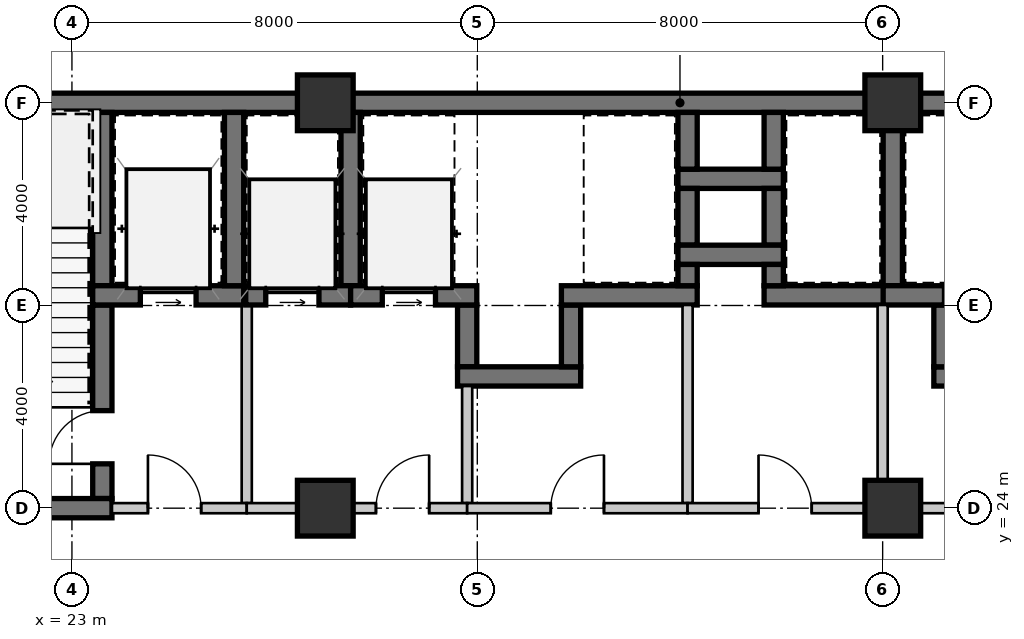
"""IFC4 building model, lengths in metres.
Left out: names, types, materials, properties, quantities, classifications, styles, units other than length and angle.
Written with IfcOpenShell. Run it as: python <this file> out.ifc"""

import sys

from ifc_helpers import new_model, si_unit, direction, frame, frame_2d, origin, origin_2d, place, context, subcontext, project, spatial, rectangle, extrude, source, transform, mapped, element, fill, save


model = new_model("IFC4")
c1 = context("Model", 3, precision=1e-05, world=origin(), true_north=direction((0.0, 1.0)))
c2 = subcontext(c1, "Body", "Model", "MODEL_VIEW")
j1 = project(units=[si_unit("LENGTHUNIT", "METRE"), si_unit("PLANEANGLEUNIT", "RADIAN")], contexts=[c1])
p1 = place(None, origin())
s1 = spatial("IfcSite", under=j1, at=p1, CompositionType="ELEMENT")
p2 = place(p1, origin())
s2 = spatial("IfcBuilding", under=s1, at=p2, CompositionType="ELEMENT")
p3 = place(p2, frame((0.0, 0.0, 8.4)))
s3 = spatial("IfcBuildingStorey", under=s2, at=p3, CompositionType="ELEMENT", Elevation=8.4)
m1 = source(origin(), c2, "Body", "SweptSolid", [
    extrude(rectangle(XDim=1.1, YDim=1.1, at=origin_2d()), origin(), (0.0, 0.0, 1.0), 4.55),
])
for number, where, z_axis, x_axis in (
    (1, (28.0, 24.0, 0.0), (0.0, 0.0, 1.0), (1.0, 0.0, 0.0)),
    (2, (39.2, 24.0, 0.0), (0.0, 0.0, 1.0), (1.0, 0.0, 0.0)),
    (3, (28.0, 32.0, 0.0), (0.0, 0.0, 1.0), (1.0, 0.0, 0.0)),
    (4, (39.2, 32.0, 0.0), (0.0, 0.0, 1.0), (1.0, 0.0, 0.0)),
):
    element("IfcColumn", number, at=place(p3, frame(where, z_axis=z_axis, x_axis=x_axis)), inside=s3, PredefinedType="COLUMN", context=c2, shape_type="MappedRepresentation", body=[
        mapped(m1, transform((0.0, 0.0, 0.0), scale=1.0)),
    ])
m2 = source(origin(), c2, "Body", "SweptSolid", [
    extrude(rectangle(XDim=9.19, YDim=0.38, at=frame_2d((4.595, 0.0))), origin(), (0.0, 0.0, 1.0), 4.29),
])
p4 = place(p3, frame((18.81, 32.0, 0.0), z_axis=(0.0, 0.0, 1.0), x_axis=(1.0, 0.0, 0.0)))
e5 = element("IfcWall", 5, at=p4, inside=s3, PredefinedType="SHEAR", context=c2, shape_type="MappedRepresentation", body=[
    mapped(m2, transform((0.0, 0.0, 0.0), scale=1.0)),
])
m3 = source(origin(), c2, "Body", "SweptSolid", [
    extrude(rectangle(XDim=11.2, YDim=0.38, at=frame_2d((5.6, 0.0))), origin(), (0.0, 0.0, 1.0), 4.29),
])
p5 = place(p3, frame((28.0, 32.0, 0.0), z_axis=(0.0, 0.0, 1.0), x_axis=(1.0, 0.0, 0.0)))
e6 = element("IfcWall", 6, at=p5, inside=s3, PredefinedType="SHEAR", context=c2, shape_type="MappedRepresentation", body=[
    mapped(m3, transform((0.0, 0.0, 0.0), scale=1.0)),
])
m4 = source(origin(), c2, "Body", "SweptSolid", [
    extrude(rectangle(XDim=11.99, YDim=0.38, at=frame_2d((5.995, 0.0))), origin(), (0.0, 0.0, 1.0), 4.29),
])
p6 = place(p3, frame((39.2, 32.0, 0.0), z_axis=(0.0, 0.0, 1.0), x_axis=(1.0, 0.0, 0.0)))
e7 = element("IfcWall", 7, at=p6, inside=s3, PredefinedType="SHEAR", context=c2, shape_type="MappedRepresentation", body=[
    mapped(m4, transform((0.0, 0.0, 0.0), scale=1.0)),
])
m5 = source(origin(), c2, "Body", "SweptSolid", [
    extrude(rectangle(XDim=3.42, YDim=0.38, at=frame_2d((1.71, 0.0))), origin(), (0.0, 0.0, 1.0), 4.29),
])
p7 = place(p3, frame((23.6, 28.39, 0.0), z_axis=(0.0, 0.0, 1.0), x_axis=(0.0, 1.0, 0.0)))
e8 = element("IfcWall", 8, at=p7, inside=s3, PredefinedType="SHEAR", context=c2, shape_type="MappedRepresentation", body=[
    mapped(m5, transform((0.0, 0.0, 0.0), scale=1.0)),
])
m6 = source(origin(), c2, "Body", "SweptSolid", [
    extrude(rectangle(XDim=3.82, YDim=0.38, at=frame_2d((1.91, 0.0))), origin(), (0.0, 0.0, 1.0), 4.29),
])
p8 = place(p3, frame((23.6, 24.19, 0.0), z_axis=(0.0, 0.0, 1.0), x_axis=(0.0, 1.0, 0.0)))
e9 = element("IfcWall", 9, at=p8, inside=s3, PredefinedType="SHEAR", context=c2, shape_type="MappedRepresentation", body=[
    mapped(m6, transform((0.0, 0.0, 0.0), scale=1.0)),
])
m7 = source(origin(), c2, "Body", "SweptSolid", [
    extrude(rectangle(XDim=1.05, YDim=2.1, at=frame_2d((0.525, 1.05))), frame((0.0, 0.2, 0.0), z_axis=(0.0, -1.0, 0.0), x_axis=(1.0, 0.0, 0.0)), (0.0, 0.0, 1.0), 0.4),
])
p9 = place(p8, frame((0.685, 0.0, 0.0)))
e10 = element("IfcOpeningElement", 10, at=p9, cuts=e9, PredefinedType="OPENING", context=c2, shape_type="MappedRepresentation", body=[
    mapped(m7, transform((0.0, 0.0, 0.0), scale=1.0)),
])
m8 = source(origin(), c2, "Body", "SweptSolid", [
    extrude(rectangle(XDim=4.98, YDim=0.38, at=frame_2d((2.49, 0.0))), origin(), (0.0, 0.0, 1.0), 4.29),
])
p10 = place(p3, frame((18.81, 24.0, 0.0), z_axis=(0.0, 0.0, 1.0), x_axis=(1.0, 0.0, 0.0)))
e11 = element("IfcWall", 11, at=p10, inside=s3, PredefinedType="SHEAR", context=c2, shape_type="MappedRepresentation", body=[
    mapped(m8, transform((0.0, 0.0, 0.0), scale=1.0)),
])
m9 = source(origin(), c2, "Body", "SweptSolid", [
    extrude(rectangle(XDim=2.98, YDim=0.38, at=frame_2d((1.49, 0.0))), origin(), (0.0, 0.0, 1.0), 4.29),
])
p11 = place(p3, frame((23.41, 28.2, 0.0), z_axis=(0.0, 0.0, 1.0), x_axis=(1.0, 0.0, 0.0)))
e12 = element("IfcWall", 12, at=p11, inside=s3, PredefinedType="SHEAR", context=c2, shape_type="MappedRepresentation", body=[
    mapped(m9, transform((0.0, 0.0, 0.0), scale=1.0)),
])
m10 = source(origin(), c2, "Body", "SweptSolid", [
    extrude(rectangle(XDim=1.1, YDim=2.15, at=frame_2d((0.55, 1.075))), frame((0.0, 0.2, 0.0), z_axis=(0.0, -1.0, 0.0), x_axis=(1.0, 0.0, 0.0)), (0.0, 0.0, 1.0), 0.4),
])
p12 = place(p11, frame((0.94, 0.0, 0.0)))
e13 = element("IfcOpeningElement", 13, at=p12, cuts=e12, PredefinedType="OPENING", context=c2, shape_type="MappedRepresentation", body=[
    mapped(m10, transform((0.0, 0.0, 0.0), scale=1.0)),
])
p13 = place(p3, frame((26.2, 28.39, 0.0), z_axis=(0.0, 0.0, 1.0), x_axis=(0.0, 1.0, 0.0)))
e14 = element("IfcWall", 14, at=p13, inside=s3, PredefinedType="SHEAR", context=c2, shape_type="MappedRepresentation", body=[
    mapped(m5, transform((0.0, 0.0, 0.0), scale=1.0)),
])
m11 = source(origin(), c2, "Body", "SweptSolid", [
    extrude(rectangle(XDim=3.91, YDim=0.2, at=frame_2d((1.955, 0.0))), origin(), (0.0, 0.0, 1.0), 4.29),
])
p14 = place(p3, frame((26.45, 24.1, 0.0), z_axis=(0.0, 0.0, 1.0), x_axis=(0.0, 1.0, 0.0)))
e15 = element("IfcWall", 15, at=p14, inside=s3, PredefinedType="SOLIDWALL", context=c2, shape_type="MappedRepresentation", body=[
    mapped(m11, transform((0.0, 0.0, 0.0), scale=1.0)),
])
m12 = source(origin(), c2, "Body", "SweptSolid", [
    extrude(rectangle(XDim=2.66, YDim=0.2, at=frame_2d((1.33, 0.0))), origin(), (0.0, 0.0, 1.0), 3.83),
])
p15 = place(p3, frame((23.79, 24.0, 0.0), z_axis=(0.0, 0.0, 1.0), x_axis=(1.0, 0.0, 0.0)))
e16 = element("IfcWall", 16, at=p15, inside=s3, PredefinedType="SOLIDWALL", context=c2, shape_type="MappedRepresentation", body=[
    mapped(m12, transform((0.0, 0.0, 0.0), scale=1.0)),
])
m13 = source(origin(), c2, "Body", "SweptSolid", [
    extrude(rectangle(XDim=1.05, YDim=2.1, at=frame_2d((0.525, 1.05))), frame((0.0, 0.11, 0.0), z_axis=(0.0, -1.0, 0.0), x_axis=(1.0, 0.0, 0.0)), (0.0, 0.0, 1.0), 0.22),
])
p16 = place(p15, frame((0.71, 0.0, 0.0)))
e17 = element("IfcOpeningElement", 17, at=p16, cuts=e16, PredefinedType="OPENING", context=c2, shape_type="MappedRepresentation", body=[
    mapped(m13, transform((0.0, 0.0, 0.0), scale=1.0)),
])
m14 = source(origin(), c2, "Body", "SweptSolid", [
    extrude(rectangle(XDim=2.08, YDim=0.38, at=frame_2d((1.04, 0.0))), origin(), (0.0, 0.0, 1.0), 4.29),
])
p17 = place(p3, frame((34.96, 30.5, 0.0), z_axis=(0.0, 0.0, 1.0), x_axis=(1.0, 0.0, 0.0)))
e18 = element("IfcWall", 18, at=p17, inside=s3, PredefinedType="SHEAR", context=c2, shape_type="MappedRepresentation", body=[
    mapped(m14, transform((0.0, 0.0, 0.0), scale=1.0)),
])
m15 = source(origin(), c2, "Body", "SweptSolid", [
    extrude(rectangle(XDim=1.12, YDim=0.38, at=frame_2d((0.56, 0.0))), origin(), (0.0, 0.0, 1.0), 4.29),
])
for number, where, z_axis, x_axis in (
    (19, (35.15, 31.81, 0.0), (0.0, 0.0, 1.0), (0.0, -1.0, 0.0)),
    (20, (36.85, 30.69, 0.0), (0.0, 0.0, 1.0), (0.0, 1.0, 0.0)),
    (21, (35.15, 30.31, 0.0), (0.0, 0.0, 1.0), (0.0, -1.0, 0.0)),
    (22, (36.85, 29.19, 0.0), (0.0, 0.0, 1.0), (0.0, 1.0, 0.0)),
):
    element("IfcWall", number, at=place(p3, frame(where, z_axis=z_axis, x_axis=x_axis)), inside=s3, PredefinedType="SHEAR", context=c2, shape_type="MappedRepresentation", body=[
        mapped(m15, transform((0.0, 0.0, 0.0), scale=1.0)),
    ])
p18 = place(p3, frame((34.96, 29.0, 0.0), z_axis=(0.0, 0.0, 1.0), x_axis=(1.0, 0.0, 0.0)))
e23 = element("IfcWall", 23, at=p18, inside=s3, PredefinedType="SHEAR", context=c2, shape_type="MappedRepresentation", body=[
    mapped(m14, transform((0.0, 0.0, 0.0), scale=1.0)),
])
m16 = source(origin(), c2, "Body", "SweptSolid", [
    extrude(rectangle(XDim=1.22, YDim=0.38, at=frame_2d((0.61, 0.0))), origin(), (0.0, 0.0, 1.0), 4.29),
])
p19 = place(p3, frame((30.8, 28.01, 0.0), z_axis=(0.0, 0.0, 1.0), x_axis=(0.0, -1.0, 0.0)))
e24 = element("IfcWall", 24, at=p19, inside=s3, PredefinedType="SHEAR", context=c2, shape_type="MappedRepresentation", body=[
    mapped(m16, transform((0.0, 0.0, 0.0), scale=1.0)),
])
m17 = source(origin(), c2, "Body", "SweptSolid", [
    extrude(rectangle(XDim=2.43, YDim=0.38, at=frame_2d((1.215, 0.0))), origin(), (0.0, 0.0, 1.0), 4.29),
])
p20 = place(p3, frame((30.61, 26.6, 0.0), z_axis=(0.0, 0.0, 1.0), x_axis=(1.0, 0.0, 0.0)))
e25 = element("IfcWall", 25, at=p20, inside=s3, PredefinedType="SHEAR", context=c2, shape_type="MappedRepresentation", body=[
    mapped(m17, transform((0.0, 0.0, 0.0), scale=1.0)),
])
p21 = place(p3, frame((32.85, 26.79, 0.0), z_axis=(0.0, 0.0, 1.0), x_axis=(0.0, 1.0, 0.0)))
e26 = element("IfcWall", 26, at=p21, inside=s3, PredefinedType="SHEAR", context=c2, shape_type="MappedRepresentation", body=[
    mapped(m16, transform((0.0, 0.0, 0.0), scale=1.0)),
])
m18 = source(origin(), c2, "Body", "SweptSolid", [
    extrude(rectangle(XDim=1.32, YDim=0.38, at=frame_2d((0.66, 0.0))), origin(), (0.0, 0.0, 1.0), 4.29),
])
p22 = place(p3, frame((41.52, 28.2, 0.0), z_axis=(0.0, 0.0, 1.0), x_axis=(-1.0, 0.0, 0.0)))
e27 = element("IfcWall", 27, at=p22, inside=s3, PredefinedType="SHEAR", context=c2, shape_type="MappedRepresentation", body=[
    mapped(m18, transform((0.0, 0.0, 0.0), scale=1.0)),
])
m19 = source(origin(), c2, "Body", "SweptSolid", [
    extrude(rectangle(XDim=2.33, YDim=0.38, at=frame_2d((1.165, 0.0))), origin(), (0.0, 0.0, 1.0), 4.29),
])
p23 = place(p3, frame((40.01, 26.6, 0.0), z_axis=(0.0, 0.0, 1.0), x_axis=(1.0, 0.0, 0.0)))
e28 = element("IfcWall", 28, at=p23, inside=s3, PredefinedType="SHEAR", context=c2, shape_type="MappedRepresentation", body=[
    mapped(m19, transform((0.0, 0.0, 0.0), scale=1.0)),
])
p24 = place(p3, frame((40.2, 28.01, 0.0), z_axis=(0.0, 0.0, 1.0), x_axis=(0.0, -1.0, 0.0)))
e29 = element("IfcWall", 29, at=p24, inside=s3, PredefinedType="SHEAR", context=c2, shape_type="MappedRepresentation", body=[
    mapped(m16, transform((0.0, 0.0, 0.0), scale=1.0)),
])
p25 = place(p3, frame((28.5, 28.39, 0.0), z_axis=(0.0, 0.0, 1.0), x_axis=(0.0, 1.0, 0.0)))
e30 = element("IfcWall", 30, at=p25, inside=s3, PredefinedType="SHEAR", context=c2, shape_type="MappedRepresentation", body=[
    mapped(m5, transform((0.0, 0.0, 0.0), scale=1.0)),
])
m20 = source(origin(), c2, "Body", "SweptSolid", [
    extrude(rectangle(XDim=2.07, YDim=0.38, at=frame_2d((1.035, 0.0))), origin(), (0.0, 0.0, 1.0), 4.29),
])
p26 = place(p3, frame((26.43, 28.2, 0.0), z_axis=(0.0, 0.0, 1.0), x_axis=(1.0, 0.0, 0.0)))
e31 = element("IfcWall", 31, at=p26, inside=s3, PredefinedType="SHEAR", context=c2, shape_type="MappedRepresentation", body=[
    mapped(m20, transform((0.0, 0.0, 0.0), scale=1.0)),
])
m21 = source(origin(), c2, "Body", "SweptSolid", [
    extrude(rectangle(XDim=1.05, YDim=2.15, at=frame_2d((0.525, 1.075))), frame((0.0, 0.2, 0.0), z_axis=(0.0, -1.0, 0.0), x_axis=(1.0, 0.0, 0.0)), (0.0, 0.0, 1.0), 0.4),
])
p27 = place(p26, frame((0.395, 0.0, 0.0)))
e32 = element("IfcOpeningElement", 32, at=p27, cuts=e31, PredefinedType="OPENING", context=c2, shape_type="MappedRepresentation", body=[
    mapped(m21, transform((0.0, 0.0, 0.0), scale=1.0)),
])
m22 = source(origin(), c2, "Body", "SweptSolid", [
    extrude(rectangle(XDim=2.49, YDim=0.38, at=frame_2d((1.245, 0.0))), origin(), (0.0, 0.0, 1.0), 4.29),
])
p28 = place(p3, frame((28.5, 28.2, 0.0), z_axis=(0.0, 0.0, 1.0), x_axis=(1.0, 0.0, 0.0)))
e33 = element("IfcWall", 33, at=p28, inside=s3, PredefinedType="SHEAR", context=c2, shape_type="MappedRepresentation", body=[
    mapped(m22, transform((0.0, 0.0, 0.0), scale=1.0)),
])
p29 = place(p28, frame((0.625, 0.0, 0.0)))
e34 = element("IfcOpeningElement", 34, at=p29, cuts=e33, PredefinedType="OPENING", context=c2, shape_type="MappedRepresentation", body=[
    mapped(m21, transform((0.0, 0.0, 0.0), scale=1.0)),
])
m23 = source(origin(), c2, "Body", "SweptSolid", [
    extrude(rectangle(XDim=2.31, YDim=0.2, at=frame_2d((1.155, 0.0))), origin(), (0.0, 0.0, 1.0), 4.29),
])
p30 = place(p3, frame((30.8, 26.41, 0.0), z_axis=(0.0, 0.0, 1.0), x_axis=(0.0, -1.0, 0.0)))
e35 = element("IfcWall", 35, at=p30, inside=s3, PredefinedType="SOLIDWALL", context=c2, shape_type="MappedRepresentation", body=[
    mapped(m23, transform((0.0, 0.0, 0.0), scale=1.0)),
])
m24 = source(origin(), c2, "Body", "SweptSolid", [
    extrude(rectangle(XDim=4.35, YDim=0.2, at=frame_2d((2.175, 0.0))), origin(), (0.0, 0.0, 1.0), 3.83),
])
p31 = place(p3, frame((30.8, 24.0, 0.0), z_axis=(0.0, 0.0, 1.0), x_axis=(-1.0, 0.0, 0.0)))
e36 = element("IfcWall", 36, at=p31, inside=s3, PredefinedType="SOLIDWALL", context=c2, shape_type="MappedRepresentation", body=[
    mapped(m24, transform((0.0, 0.0, 0.0), scale=1.0)),
])
p32 = place(p31, frame((0.75, 0.0, 0.0)))
e37 = element("IfcOpeningElement", 37, at=p32, cuts=e36, PredefinedType="OPENING", context=c2, shape_type="MappedRepresentation", body=[
    mapped(m13, transform((0.0, 0.0, 0.0), scale=1.0)),
])
m25 = source(origin(), c2, "Body", "SweptSolid", [
    extrude(rectangle(XDim=2.68, YDim=0.38, at=frame_2d((1.34, 0.0))), origin(), (0.0, 0.0, 1.0), 4.29),
])
p33 = place(p3, frame((32.66, 28.2, 0.0), z_axis=(0.0, 0.0, 1.0), x_axis=(1.0, 0.0, 0.0)))
e38 = element("IfcWall", 38, at=p33, inside=s3, PredefinedType="SHEAR", context=c2, shape_type="MappedRepresentation", body=[
    mapped(m25, transform((0.0, 0.0, 0.0), scale=1.0)),
])
m26 = source(origin(), c2, "Body", "SweptSolid", [
    extrude(rectangle(XDim=0.42, YDim=0.38, at=frame_2d((0.21, 0.0))), origin(), (0.0, 0.0, 1.0), 4.29),
])
p34 = place(p3, frame((35.15, 28.39, 0.0), z_axis=(0.0, 0.0, 1.0), x_axis=(0.0, 1.0, 0.0)))
e39 = element("IfcWall", 39, at=p34, inside=s3, PredefinedType="SHEAR", context=c2, shape_type="MappedRepresentation", body=[
    mapped(m26, transform((0.0, 0.0, 0.0), scale=1.0)),
])
p35 = place(p3, frame((39.2, 28.39, 0.0), z_axis=(0.0, 0.0, 1.0), x_axis=(0.0, 1.0, 0.0)))
e40 = element("IfcWall", 40, at=p35, inside=s3, PredefinedType="SHEAR", context=c2, shape_type="MappedRepresentation", body=[
    mapped(m5, transform((0.0, 0.0, 0.0), scale=1.0)),
])
m27 = source(origin(), c2, "Body", "SweptSolid", [
    extrude(rectangle(XDim=2.36, YDim=0.38, at=frame_2d((1.18, 0.0))), origin(), (0.0, 0.0, 1.0), 4.29),
])
p36 = place(p3, frame((36.66, 28.2, 0.0), z_axis=(0.0, 0.0, 1.0), x_axis=(1.0, 0.0, 0.0)))
e41 = element("IfcWall", 41, at=p36, inside=s3, PredefinedType="SHEAR", context=c2, shape_type="MappedRepresentation", body=[
    mapped(m27, transform((0.0, 0.0, 0.0), scale=1.0)),
])
p37 = place(p3, frame((36.85, 28.81, 0.0), z_axis=(0.0, 0.0, 1.0), x_axis=(0.0, -1.0, 0.0)))
e42 = element("IfcWall", 42, at=p37, inside=s3, PredefinedType="SHEAR", context=c2, shape_type="MappedRepresentation", body=[
    mapped(m26, transform((0.0, 0.0, 0.0), scale=1.0)),
])
m28 = source(origin(), c2, "Body", "SweptSolid", [
    extrude(rectangle(XDim=1.21, YDim=0.38, at=frame_2d((0.605, 0.0))), origin(), (0.0, 0.0, 1.0), 4.29),
])
p38 = place(p3, frame((39.01, 28.2, 0.0), z_axis=(0.0, 0.0, 1.0), x_axis=(1.0, 0.0, 0.0)))
e43 = element("IfcWall", 43, at=p38, inside=s3, PredefinedType="SHEAR", context=c2, shape_type="MappedRepresentation", body=[
    mapped(m28, transform((0.0, 0.0, 0.0), scale=1.0)),
])
p39 = place(p3, frame((35.15, 28.01, 0.0), z_axis=(0.0, 0.0, 1.0), x_axis=(0.0, -1.0, 0.0)))
e44 = element("IfcWall", 44, at=p39, inside=s3, PredefinedType="SOLIDWALL", context=c2, shape_type="MappedRepresentation", body=[
    mapped(m11, transform((0.0, 0.0, 0.0), scale=1.0)),
])
m29 = source(origin(), c2, "Body", "SweptSolid", [
    extrude(rectangle(XDim=4.35, YDim=0.2, at=frame_2d((2.175, 0.0))), origin(), (0.0, 0.0, 1.0), 3.83),
])
p40 = place(p3, frame((35.15, 24.0, 0.0), z_axis=(0.0, 0.0, 1.0), x_axis=(-1.0, 0.0, 0.0)))
e45 = element("IfcWall", 45, at=p40, inside=s3, PredefinedType="SOLIDWALL", context=c2, shape_type="MappedRepresentation", body=[
    mapped(m29, transform((0.0, 0.0, 0.0), scale=1.0)),
])
p41 = place(p40, frame((1.65, 0.0, 0.0)))
e46 = element("IfcOpeningElement", 46, at=p41, cuts=e45, PredefinedType="OPENING", context=c2, shape_type="MappedRepresentation", body=[
    mapped(m13, transform((0.0, 0.0, 0.0), scale=1.0)),
])
p42 = place(p3, frame((39.0, 28.01, 0.0), z_axis=(0.0, 0.0, 1.0), x_axis=(0.0, -1.0, 0.0)))
e47 = element("IfcWall", 47, at=p42, inside=s3, PredefinedType="SOLIDWALL", context=c2, shape_type="MappedRepresentation", body=[
    mapped(m11, transform((0.0, 0.0, 0.0), scale=1.0)),
])
m30 = source(origin(), c2, "Body", "SweptSolid", [
    extrude(rectangle(XDim=3.85, YDim=0.2, at=frame_2d((1.925, 0.0))), origin(), (0.0, 0.0, 1.0), 3.83),
])
p43 = place(p3, frame((39.0, 24.0, 0.0), z_axis=(0.0, 0.0, 1.0), x_axis=(-1.0, 0.0, 0.0)))
e48 = element("IfcWall", 48, at=p43, inside=s3, PredefinedType="SOLIDWALL", context=c2, shape_type="MappedRepresentation", body=[
    mapped(m30, transform((0.0, 0.0, 0.0), scale=1.0)),
])
p44 = place(p43, frame((1.4, 0.0, 0.0)))
e49 = element("IfcOpeningElement", 49, at=p44, cuts=e48, PredefinedType="OPENING", context=c2, shape_type="MappedRepresentation", body=[
    mapped(m13, transform((0.0, 0.0, 0.0), scale=1.0)),
])
m31 = source(origin(), c2, "Body", "SweptSolid", [
    extrude(rectangle(XDim=4.55, YDim=0.2, at=frame_2d((2.275, 0.0))), origin(), (0.0, 0.0, 1.0), 3.757),
])
p45 = place(p3, frame((43.55, 24.0, 0.0), z_axis=(0.0, 0.0, 1.0), x_axis=(-1.0, 0.0, 0.0)))
e50 = element("IfcWall", 50, at=p45, inside=s3, PredefinedType="SOLIDWALL", context=c2, shape_type="MappedRepresentation", body=[
    mapped(m31, transform((0.0, 0.0, 0.0), scale=1.0)),
])
p46 = place(p45, frame((1.75, 0.0, 0.0)))
e51 = element("IfcOpeningElement", 51, at=p46, cuts=e50, PredefinedType="OPENING", context=c2, shape_type="MappedRepresentation", body=[
    mapped(m13, transform((0.0, 0.0, 0.0), scale=1.0)),
])
m32 = source(origin(), c2, "Body", "SweptSolid", [
    extrude(rectangle(XDim=1.05, YDim=2.1, at=frame_2d((0.525, 1.05))), frame((0.0, 0.025, 0.0), z_axis=(0.0, -1.0, 0.0), x_axis=(1.0, 0.0, 0.0)), (0.0, 0.0, 1.0), 0.05),
])
p47 = place(p9, origin())
e52 = element("IfcDoor", 52, at=p47, inside=s3, OperationType="SINGLE_SWING_LEFT", PredefinedType="DOOR", context=c2, shape_type="MappedRepresentation", body=[
    mapped(m32, transform((0.0, 0.0, 0.0), scale=1.0)),
])
fill(e10, e52)
m33 = source(origin(), c2, "Body", "SweptSolid", [
    extrude(rectangle(XDim=1.1, YDim=2.15, at=frame_2d((0.55, 1.075))), frame((0.0, 0.025, 0.0), z_axis=(0.0, -1.0, 0.0), x_axis=(1.0, 0.0, 0.0)), (0.0, 0.0, 1.0), 0.05),
])
p48 = place(p12, origin())
e53 = element("IfcDoor", 53, at=p48, inside=s3, OperationType="SLIDING_TO_LEFT", PredefinedType="DOOR", context=c2, shape_type="MappedRepresentation", body=[
    mapped(m33, transform((0.0, 0.0, 0.0), scale=1.0)),
])
fill(e13, e53)
p49 = place(p16, origin())
e54 = element("IfcDoor", 54, at=p49, inside=s3, OperationType="SINGLE_SWING_LEFT", PredefinedType="DOOR", context=c2, shape_type="MappedRepresentation", body=[
    mapped(m32, transform((0.0, 0.0, 0.0), scale=1.0)),
])
fill(e17, e54)
m34 = source(origin(), c2, "Body", "SweptSolid", [
    extrude(rectangle(XDim=1.05, YDim=2.15, at=frame_2d((0.525, 1.075))), frame((0.0, 0.025, 0.0), z_axis=(0.0, -1.0, 0.0), x_axis=(1.0, 0.0, 0.0)), (0.0, 0.0, 1.0), 0.05),
])
p50 = place(p27, origin())
e55 = element("IfcDoor", 55, at=p50, inside=s3, OperationType="SLIDING_TO_LEFT", PredefinedType="DOOR", context=c2, shape_type="MappedRepresentation", body=[
    mapped(m34, transform((0.0, 0.0, 0.0), scale=1.0)),
])
fill(e32, e55)
p51 = place(p29, origin())
e56 = element("IfcDoor", 56, at=p51, inside=s3, OperationType="SLIDING_TO_LEFT", PredefinedType="DOOR", context=c2, shape_type="MappedRepresentation", body=[
    mapped(m34, transform((0.0, 0.0, 0.0), scale=1.0)),
])
fill(e34, e56)
p52 = place(p32, frame((1.05, 0.0, 0.0), z_axis=(0.0, 0.0, 1.0), x_axis=(-1.0, 0.0, 0.0)))
e57 = element("IfcDoor", 57, at=p52, inside=s3, OperationType="SINGLE_SWING_RIGHT", PredefinedType="DOOR", context=c2, shape_type="MappedRepresentation", body=[
    mapped(m32, transform((0.0, 0.0, 0.0), scale=1.0)),
])
fill(e37, e57)
p53 = place(p41, frame((1.05, 0.0, 0.0), z_axis=(0.0, 0.0, 1.0), x_axis=(-1.0, 0.0, 0.0)))
e58 = element("IfcDoor", 58, at=p53, inside=s3, OperationType="SINGLE_SWING_RIGHT", PredefinedType="DOOR", context=c2, shape_type="MappedRepresentation", body=[
    mapped(m32, transform((0.0, 0.0, 0.0), scale=1.0)),
])
fill(e46, e58)
p54 = place(p44, frame((1.05, 0.0, 0.0), z_axis=(0.0, 0.0, 1.0), x_axis=(-1.0, 0.0, 0.0)))
e59 = element("IfcDoor", 59, at=p54, inside=s3, OperationType="SINGLE_SWING_LEFT", PredefinedType="DOOR", context=c2, shape_type="MappedRepresentation", body=[
    mapped(m32, transform((0.0, 0.0, 0.0), scale=1.0)),
])
fill(e49, e59)
save(model, sys.argv[1])
